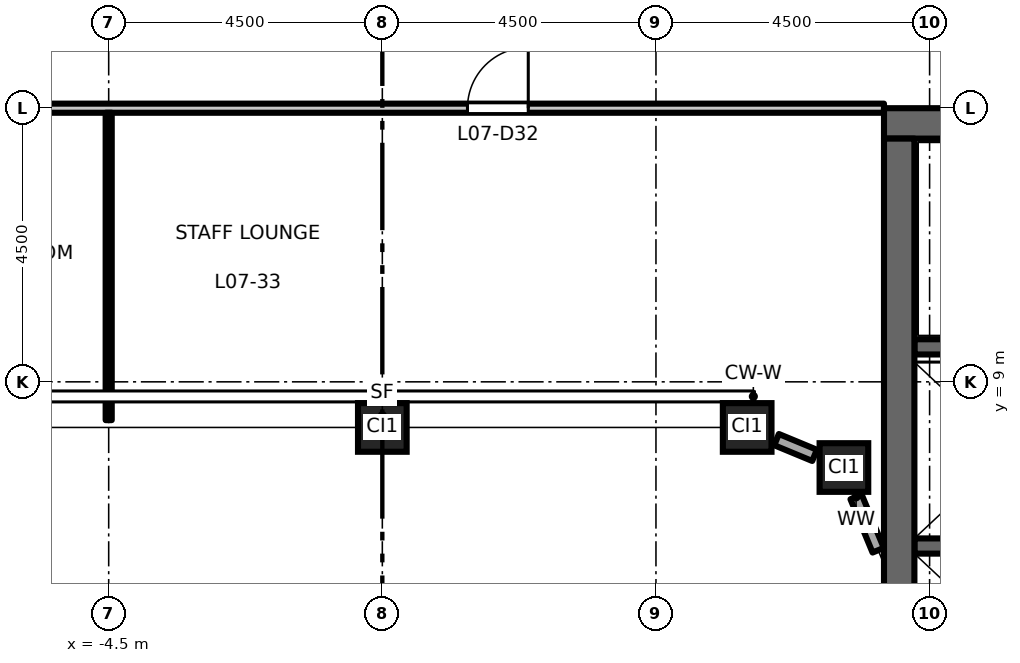
"""IFC4 building model, lengths in metres.
Left out: names, types, materials, properties, quantities, classifications, styles, units other than length and angle.
Written with IfcOpenShell. Run it as: python <this file> out.ifc"""

import sys

from ifc_helpers import new_model, si_unit, direction, frame, frame_2d, origin, origin_2d, place, context, subcontext, project, spatial, rectangle, hollow_rectangle, extrude, element, fill, save


model = new_model("IFC4")
c1 = context("Model", 3, precision=1e-05, world=origin(), true_north=direction((0.0, 1.0)))
c2 = subcontext(c1, "Body", "Model", "MODEL_VIEW")
j1 = project(units=[si_unit("LENGTHUNIT", "METRE"), si_unit("PLANEANGLEUNIT", "RADIAN")], contexts=[c1])
p1 = place(None, origin())
s1 = spatial("IfcSite", under=j1, at=p1, CompositionType="ELEMENT")
p2 = place(p1, origin())
s2 = spatial("IfcBuilding", under=s1, at=p2, CompositionType="ELEMENT")
p3 = place(p2, frame((0.0, 0.0, 35.7)))
s3 = spatial("IfcBuildingStorey", under=s2, at=p3, CompositionType="ELEMENT", Elevation=35.7)
for number, where, z_axis, x_axis in (
    (1, (0.0, 8.25, 0.0), (0.0, 0.0, 1.0), (1.0, 0.0, 0.0)),
    (2, (6.0, 8.25, 0.0), (0.0, 0.0, 1.0), (1.0, 0.0, 0.0)),
    (3, (7.591, 7.591, 0.0), (0.0, 0.0, 1.0), (1.0, 0.0, 0.0)),
):
    element("IfcColumn", number, at=place(p3, frame(where, z_axis=z_axis, x_axis=x_axis)), inside=s3, PredefinedType="COLUMN", context=c2, shape_type="SweptSolid", body=[
        extrude(hollow_rectangle(XDim=0.8, YDim=0.8, WallThickness=0.05, at=origin_2d()), origin(), (0.0, 0.0, 1.0), 4.5),
    ])
p4 = place(p3, frame((8.75, 6.3, 0.0), z_axis=(0.0, 0.0, 1.0), x_axis=(1.0, 0.0, 0.0)))
e4 = element("IfcWall", 4, at=p4, inside=s3, PredefinedType="SHEAR", context=c2, shape_type="SweptSolid", body=[
    extrude(rectangle(XDim=3.1, YDim=0.25, at=frame_2d((1.55, 0.0))), origin(), (0.0, 0.0, 1.0), 4.35),
])
p5 = place(p3, frame((8.75, 9.575, 0.0), z_axis=(0.0, 0.0, 1.0), x_axis=(1.0, 0.0, 0.0)))
e5 = element("IfcWall", 5, at=p5, inside=s3, PredefinedType="SHEAR", context=c2, shape_type="SweptSolid", body=[
    extrude(rectangle(XDim=8.0, YDim=0.25, at=frame_2d((4.0, 0.0))), origin(), (0.0, 0.0, 1.0), 4.35),
])
p6 = place(p5, frame((6.65, 0.0, 0.0)))
e6 = element("IfcOpeningElement", 6, at=p6, cuts=e5, PredefinedType="OPENING", context=c2, shape_type="SweptSolid", body=[
    extrude(rectangle(XDim=1.1, YDim=2.1, at=frame_2d((0.55, 1.05))), frame((0.0, 0.135, 0.0), z_axis=(0.0, -1.0, 0.0), x_axis=(1.0, 0.0, 0.0)), (0.0, 0.0, 1.0), 0.27),
])
p7 = place(p3, frame((8.25, 13.25, 0.0), z_axis=(0.0, 0.0, 1.0), x_axis=(1.0, 0.0, 0.0)))
e7 = element("IfcWall", 7, at=p7, inside=s3, PredefinedType="SHEAR", context=c2, shape_type="SweptSolid", body=[
    extrude(rectangle(XDim=13.5, YDim=0.5, at=frame_2d((6.75, 0.0))), origin(), (0.0, 0.0, 1.0), 4.35),
])
p8 = place(p3, frame((8.5, -13.0, 0.0), z_axis=(0.0, 0.0, 1.0), x_axis=(0.0, 1.0, 0.0)))
e8 = element("IfcWall", 8, at=p8, inside=s3, PredefinedType="SHEAR", context=c2, shape_type="SweptSolid", body=[
    extrude(rectangle(XDim=26.0, YDim=0.5, at=frame_2d((13.0, 0.0))), origin(), (0.0, 0.0, 1.0), 4.35),
])
p9 = place(p3, frame((8.154, 6.231, 0.0), z_axis=(0.0, 0.0, 1.0), x_axis=(-0.382624318388, 0.923904016107, 0.0)))
e9 = element("IfcWall", 9, at=p9, inside=s3, PredefinedType="STANDARD", context=c2, shape_type="SweptSolid", body=[
    extrude(rectangle(XDim=0.949, YDim=0.2, at=frame_2d((0.475, 0.0))), origin(), (0.0, 0.0, 1.0), 3.73),
])
p10 = place(p3, frame((7.108, 7.791, 0.0), z_axis=(0.0, 0.0, 1.0), x_axis=(-0.923854141361, 0.382744726273, 0.0)))
e10 = element("IfcWall", 10, at=p10, inside=s3, PredefinedType="STANDARD", context=c2, shape_type="SweptSolid", body=[
    extrude(rectangle(XDim=0.677, YDim=0.2, at=frame_2d((0.338, 0.0))), origin(), (0.0, 0.0, 1.0), 3.73),
])
p11 = place(p3, frame((-8.25, 13.5, 0.0), z_axis=(0.0, 0.0, 1.0), x_axis=(1.0, 0.0, 0.0)))
e11 = element("IfcWall", 11, at=p11, inside=s3, PredefinedType="PARTITIONING", context=c2, shape_type="SweptSolid", body=[
    extrude(rectangle(XDim=16.5, YDim=0.15, at=frame_2d((8.25, 0.0))), origin(), (0.0, 0.0, 1.0), 3.85),
])
p12 = place(p11, frame((1.4, 0.0, 0.0)))
e12 = element("IfcOpeningElement", 12, at=p12, cuts=e11, PredefinedType="OPENING", context=c2, shape_type="SweptSolid", body=[
    extrude(rectangle(XDim=1.0, YDim=2.1, at=frame_2d((0.5, 1.05))), frame((0.0, 0.085, 0.0), z_axis=(0.0, -1.0, 0.0), x_axis=(1.0, 0.0, 0.0)), (0.0, 0.0, 1.0), 0.17),
])
p13 = place(p11, frame((9.65, 0.0, 0.0)))
e13 = element("IfcOpeningElement", 13, at=p13, cuts=e11, PredefinedType="OPENING", context=c2, shape_type="SweptSolid", body=[
    extrude(rectangle(XDim=1.0, YDim=2.1, at=frame_2d((0.5, 1.05))), frame((0.0, 0.085, 0.0), z_axis=(0.0, -1.0, 0.0), x_axis=(1.0, 0.0, 0.0)), (0.0, 0.0, 1.0), 0.17),
])
p14 = place(p3, frame((-4.5, 8.37, 0.0), z_axis=(0.0, 0.0, 1.0), x_axis=(0.0, 1.0, 0.0)))
e14 = element("IfcWall", 14, at=p14, inside=s3, PredefinedType="PARTITIONING", context=c2, shape_type="SweptSolid", body=[
    extrude(rectangle(XDim=5.055, YDim=0.1, at=frame_2d((2.527, 0.0))), origin(), (0.0, 0.0, 1.0), 3.35),
])
p15 = place(p13, origin())
e15 = element("IfcDoor", 15, at=p15, inside=s3, OperationType="SINGLE_SWING_RIGHT", PredefinedType="DOOR", context=c2, shape_type="SweptSolid", body=[
    extrude(rectangle(XDim=1.0, YDim=2.1, at=frame_2d((0.5, 1.05))), frame((0.0, 0.025, 0.0), z_axis=(0.0, -1.0, 0.0), x_axis=(1.0, 0.0, 0.0)), (0.0, 0.0, 1.0), 0.05),
])
fill(e13, e15)
save(model, sys.argv[1])
